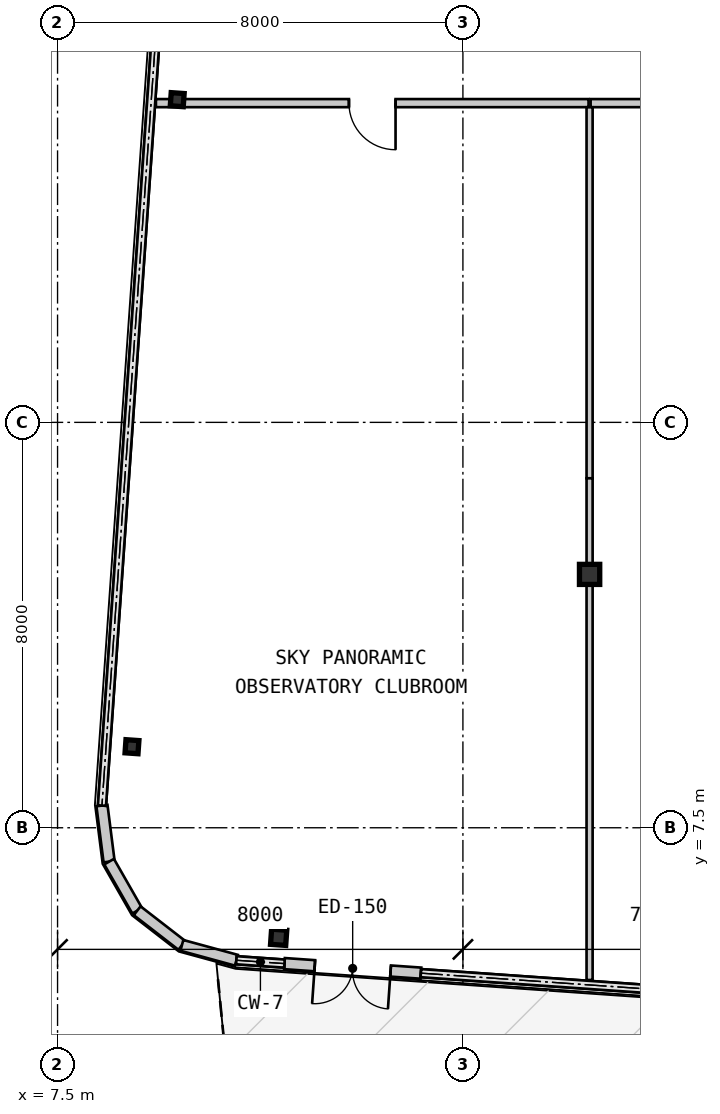
"""IFC4 building model, lengths in metres.
Left out: names, types, materials, properties, quantities, classifications, styles, units other than length and angle.
Written with IfcOpenShell. Run it as: python <this file> out.ifc"""

import sys

from ifc_helpers import new_model, si_unit, direction, frame, frame_2d, origin, origin_2d, place, context, subcontext, project, spatial, rectangle, hollow_rectangle, i_section, extrude, source, transform, mapped, element, fill, save


model = new_model("IFC4")
c1 = context("Model", 3, precision=1e-05, world=origin(), true_north=direction((0.0, 1.0)))
c2 = subcontext(c1, "Body", "Model", "MODEL_VIEW")
j1 = project(units=[si_unit("LENGTHUNIT", "METRE"), si_unit("PLANEANGLEUNIT", "RADIAN")], contexts=[c1])
p1 = place(None, origin())
s1 = spatial("IfcSite", under=j1, at=p1, CompositionType="ELEMENT")
p2 = place(p1, origin())
s2 = spatial("IfcBuilding", under=s1, at=p2, CompositionType="ELEMENT")
p3 = place(p2, frame((0.0, 0.0, 116.55)))
s3 = spatial("IfcBuildingStorey", under=s2, at=p3, CompositionType="ELEMENT", Elevation=116.55)
m1 = source(origin(), c2, "Body", "SweptSolid", [
    extrude(i_section(OverallWidth=0.4, OverallDepth=0.396, WebThickness=0.022, FlangeThickness=0.034, at=origin_2d()), origin(), (0.0, 0.0, 1.0), 3.85),
])
p4 = place(p3, frame((18.0, 12.5, 0.0), z_axis=(0.0, 0.0, 1.0), x_axis=(1.0, 0.0, 0.0)))
e1 = element("IfcColumn", 1, at=p4, inside=s3, PredefinedType="COLUMN", context=c2, shape_type="MappedRepresentation", body=[
    mapped(m1, transform((0.0, 0.0, 0.0), scale=1.0)),
])
m2 = source(origin(), c2, "Body", "SweptSolid", [
    extrude(hollow_rectangle(XDim=0.3, YDim=0.3, WallThickness=0.012, at=origin_2d()), origin(), (0.0, 0.0, 1.0), 3.85),
])
p5 = place(p3, frame((11.864, 5.338, 0.0), z_axis=(0.0, 0.0, 1.0), x_axis=(0.99756405026, -0.069756473744, 0.0)))
e2 = element("IfcColumn", 2, at=p5, inside=s3, PredefinedType="COLUMN", context=c2, shape_type="MappedRepresentation", body=[
    mapped(m2, transform((0.0, 0.0, 0.0), scale=1.0)),
])
m3 = source(origin(), c2, "Body", "SweptSolid", [
    extrude(i_section(OverallWidth=0.256, OverallDepth=0.26, WebThickness=0.01, FlangeThickness=0.017, at=origin_2d()), origin(), (0.0, 0.0, 1.0), 3.85),
])
for number, where, z_axis, x_axis in (
    (3, (8.969, 9.1, 0.0), (0.0, 0.0, 1.0), (0.998, -0.07, 0.0)),
    (4, (9.862, 21.868, 0.0), (0.0, 0.0, 1.0), (0.998, -0.07, 0.0)),
):
    element("IfcColumn", number, at=place(p3, frame(where, z_axis=z_axis, x_axis=x_axis)), inside=s3, PredefinedType="COLUMN", context=c2, shape_type="MappedRepresentation", body=[
        mapped(m3, transform((0.0, 0.0, 0.0), scale=1.0)),
    ])
m4 = source(origin(), c2, "Body", "SweptSolid", [
    extrude(rectangle(XDim=1.116, YDim=0.22, at=frame_2d((0.558, 0.0))), origin(), (0.0, 0.0, 1.0), 3.63),
])
for number, where, z_axis, x_axis in (
    (5, (8.376, 7.938, 0.0), (0.0, 0.0, 1.0), (0.126, -0.992, 0.0)),
    (6, (8.517, 6.831, 0.0), (0.0, 0.0, 1.0), (0.496, -0.868, 0.0)),
    (7, (9.071, 5.862, 0.0), (0.0, 0.0, 1.0), (0.791, -0.612, 0.0)),
    (8, (9.953, 5.179, 0.0), (0.0, 0.0, 1.0), (0.965, -0.263, 0.0)),
):
    element("IfcWall", number, at=place(p3, frame(where, z_axis=z_axis, x_axis=x_axis)), inside=s3, PredefinedType="SOLIDWALL", context=c2, shape_type="MappedRepresentation", body=[
        mapped(m4, transform((0.0, 0.0, 0.0), scale=1.0)),
    ])
m5 = source(origin(), c2, "Body", "SweptSolid", [
    extrude(rectangle(XDim=2.7, YDim=0.22, at=frame_2d((1.35, 0.0))), origin(), (0.0, 0.0, 1.0), 3.63),
])
p6 = place(p3, frame((11.978, 4.819, 0.0), z_axis=(0.0, 0.0, 1.0), x_axis=(0.997567210959, -0.069711258919, 0.0)))
e9 = element("IfcWall", 9, at=p6, inside=s3, PredefinedType="SOLIDWALL", context=c2, shape_type="MappedRepresentation", body=[
    mapped(m5, transform((0.0, 0.0, 0.0), scale=1.0)),
])
m6 = source(origin(), c2, "Body", "SweptSolid", [
    extrude(rectangle(XDim=1.5, YDim=2.2, at=frame_2d((0.75, 1.1))), frame((0.0, 0.12, 0.0), z_axis=(0.0, -1.0, 0.0), x_axis=(1.0, 0.0, 0.0)), (0.0, 0.0, 1.0), 0.24),
])
p7 = place(p6, frame((0.6, 0.0, 0.0)))
e10 = element("IfcOpeningElement", 10, at=p7, cuts=e9, PredefinedType="OPENING", context=c2, shape_type="MappedRepresentation", body=[
    mapped(m6, transform((0.0, 0.0, 0.0), scale=1.0)),
])
m7 = source(origin(), c2, "Body", "SweptSolid", [
    extrude(rectangle(XDim=8.538, YDim=0.16, at=frame_2d((4.269, 0.0))), origin(), (0.0, 0.0, 1.0), 3.63),
])
p8 = place(p3, frame((17.98, 21.8, 0.0), z_axis=(0.0, 0.0, 1.0), x_axis=(-1.0, 0.0, 0.0)))
e11 = element("IfcWall", 11, at=p8, inside=s3, PredefinedType="PARTITIONING", context=c2, shape_type="MappedRepresentation", body=[
    mapped(m7, transform((0.0, 0.0, 0.0), scale=1.0)),
])
m8 = source(origin(), c2, "Body", "SweptSolid", [
    extrude(rectangle(XDim=0.92, YDim=2.1, at=frame_2d((0.46, 1.05))), frame((0.0, 0.09, 0.0), z_axis=(0.0, -1.0, 0.0), x_axis=(1.0, 0.0, 0.0)), (0.0, 0.0, 1.0), 0.18),
])
p9 = place(p8, frame((3.809, 0.0, 0.0)))
e12 = element("IfcOpeningElement", 12, at=p9, cuts=e11, PredefinedType="OPENING", context=c2, shape_type="MappedRepresentation", body=[
    mapped(m8, transform((0.0, 0.0, 0.0), scale=1.0)),
])
m9 = source(origin(), c2, "Body", "SweptSolid", [
    extrude(rectangle(XDim=9.959, YDim=0.16, at=frame_2d((4.98, 0.0))), origin(), (0.0, 0.0, 1.0), 3.63),
])
p10 = place(p3, frame((27.98, 21.8, 0.0), z_axis=(0.0, 0.0, 1.0), x_axis=(-1.0, 0.0, 0.0)))
e13 = element("IfcWall", 13, at=p10, inside=s3, PredefinedType="PARTITIONING", context=c2, shape_type="MappedRepresentation", body=[
    mapped(m9, transform((0.0, 0.0, 0.0), scale=1.0)),
])
p11 = place(p10, frame((4.52, 0.0, 0.0)))
e14 = element("IfcOpeningElement", 14, at=p11, cuts=e13, PredefinedType="OPENING", context=c2, shape_type="MappedRepresentation", body=[
    mapped(m8, transform((0.0, 0.0, 0.0), scale=1.0)),
])
m10 = source(origin(), c2, "Body", "SweptSolid", [
    extrude(rectangle(XDim=7.322, YDim=0.12, at=frame_2d((3.661, 0.0))), origin(), (0.0, 0.0, 1.0), 3.63),
])
p12 = place(p3, frame((18.0, 21.718, 0.0), z_axis=(0.0, 0.0, 1.0), x_axis=(0.0, -1.0, 0.0)))
e15 = element("IfcWall", 15, at=p12, inside=s3, PredefinedType="PARTITIONING", context=c2, shape_type="MappedRepresentation", body=[
    mapped(m10, transform((0.0, 0.0, 0.0), scale=1.0)),
])
m11 = source(origin(), c2, "Body", "SweptSolid", [
    extrude(rectangle(XDim=1.901, YDim=0.12, at=frame_2d((0.951, 0.0))), origin(), (0.0, 0.0, 1.0), 3.097),
])
p13 = place(p3, frame((18.0, 14.396, 0.0), z_axis=(0.0, 0.0, 1.0), x_axis=(0.0, -1.0, 0.0)))
e16 = element("IfcWall", 16, at=p13, inside=s3, PredefinedType="PARTITIONING", context=c2, shape_type="MappedRepresentation", body=[
    mapped(m11, transform((0.0, 0.0, 0.0), scale=1.0)),
])
m12 = source(origin(), c2, "Body", "SweptSolid", [
    extrude(rectangle(XDim=7.999, YDim=0.12, at=frame_2d((4.0, 0.0))), origin(), (0.0, 0.0, 1.0), 3.63),
])
p14 = place(p3, frame((18.0, 12.495, 0.0), z_axis=(0.0, 0.0, 1.0), x_axis=(0.0, -1.0, 0.0)))
e17 = element("IfcWall", 17, at=p14, inside=s3, PredefinedType="PARTITIONING", context=c2, shape_type="MappedRepresentation", body=[
    mapped(m12, transform((0.0, 0.0, 0.0), scale=1.0)),
])
m13 = source(origin(), c2, "Body", "SweptSolid", [
    extrude(rectangle(XDim=1.5, YDim=2.2, at=frame_2d((0.75, 1.1))), frame((0.0, 0.025, 0.0), z_axis=(0.0, -1.0, 0.0), x_axis=(1.0, 0.0, 0.0)), (0.0, 0.0, 1.0), 0.05),
])
p15 = place(p7, frame((1.5, 0.0, 0.0), z_axis=(0.0, 0.0, 1.0), x_axis=(-1.0, 0.0, 0.0)))
e18 = element("IfcDoor", 18, at=p15, inside=s3, OperationType="DOUBLE_DOOR_SINGLE_SWING", PredefinedType="DOOR", context=c2, shape_type="MappedRepresentation", body=[
    mapped(m13, transform((0.0, 0.0, 0.0), scale=1.0)),
])
fill(e10, e18)
m14 = source(origin(), c2, "Body", "SweptSolid", [
    extrude(rectangle(XDim=0.92, YDim=2.1, at=frame_2d((0.46, 1.05))), frame((0.0, 0.025, 0.0), z_axis=(0.0, -1.0, 0.0), x_axis=(1.0, 0.0, 0.0)), (0.0, 0.0, 1.0), 0.05),
])
p16 = place(p9, origin())
e19 = element("IfcDoor", 19, at=p16, inside=s3, OperationType="SINGLE_SWING_LEFT", PredefinedType="DOOR", context=c2, shape_type="MappedRepresentation", body=[
    mapped(m14, transform((0.0, 0.0, 0.0), scale=1.0)),
])
fill(e12, e19)
save(model, sys.argv[1])
